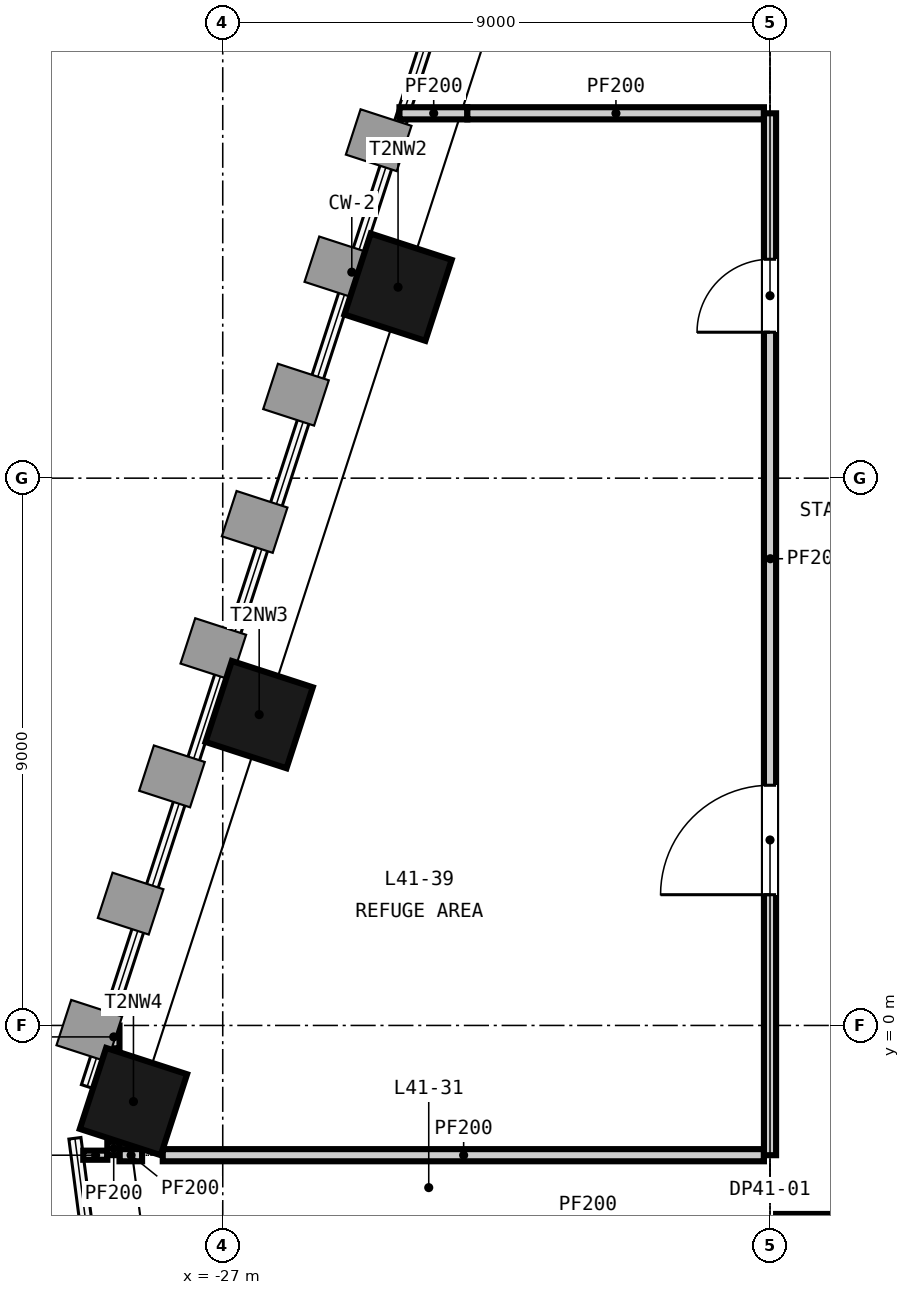
"""IFC4 building model, lengths in metres.
Left out: names, types, materials, properties, quantities, classifications, styles, units other than length and angle.
Written with IfcOpenShell. Run it as: python <this file> out.ifc"""

import sys

from ifc_helpers import new_model, si_unit, direction, frame, frame_2d, origin, origin_2d, place, context, subcontext, project, spatial, rectangle, extrude, element, fill, save


model = new_model("IFC4")
c1 = context("Model", 3, precision=1e-05, world=origin(), true_north=direction((0.0, 1.0)))
c2 = subcontext(c1, "Body", "Model", "MODEL_VIEW")
j1 = project(units=[si_unit("LENGTHUNIT", "METRE"), si_unit("PLANEANGLEUNIT", "RADIAN")], contexts=[c1])
p1 = place(None, origin())
s1 = spatial("IfcSite", under=j1, at=p1, CompositionType="ELEMENT")
p2 = place(p1, origin())
s2 = spatial("IfcBuilding", under=s1, at=p2, CompositionType="ELEMENT")
p3 = place(p2, frame((0.0, 0.0, 166.3)))
s3 = spatial("IfcBuildingStorey", under=s2, at=p3, CompositionType="ELEMENT", Elevation=166.3)
for number, where, z_axis, x_axis in (
    (1, (-24.117, 12.141, -0.3), (0.0, 0.0, 1.0), (-0.309, -0.951, 0.0)),
    (2, (-26.401, 5.111, -0.3), (0.0, 0.0, 1.0), (-0.309, -0.951, 0.0)),
    (3, (-28.468, -1.252, -0.3), (0.0, 0.0, 1.0), (-0.309, -0.951, 0.0)),
):
    element("IfcColumn", number, at=place(p3, frame(where, z_axis=z_axis, x_axis=x_axis)), inside=s3, PredefinedType="COLUMN", context=c2, shape_type="SweptSolid", body=[
        extrude(rectangle(XDim=1.4, YDim=1.4, at=origin_2d()), origin(), (0.0, 0.0, 1.0), 4.65),
    ])
p4 = place(p3, frame((-17.9, -3.2, 0.0), z_axis=(0.0, 0.0, 1.0), x_axis=(1.0, 0.0, 0.0)))
e4 = element("IfcWall", 4, at=p4, inside=s3, PredefinedType="PARTITIONING", context=c2, shape_type="SweptSolid", body=[
    extrude(rectangle(XDim=8.8, YDim=0.2, at=frame_2d((4.4, 0.0))), origin(), (0.0, 0.0, 1.0), 4.35),
])
p5 = place(p3, frame((-29.294, -2.134, 0.0), z_axis=(0.0, 0.0, 1.0), x_axis=(1.0, 0.0, 0.0)))
e5 = element("IfcWall", 5, at=p5, inside=s3, PredefinedType="PARTITIONING", context=c2, shape_type="SweptSolid", body=[
    extrude(rectangle(XDim=0.396, YDim=0.15, at=frame_2d((0.198, 0.0))), origin(), (0.0, 0.0, 1.0), 4.35),
])
p6 = place(p3, frame((-28.698, -2.134, 0.0), z_axis=(0.0, 0.0, 1.0), x_axis=(1.0, 0.0, 0.0)))
e6 = element("IfcWall", 6, at=p6, inside=s3, PredefinedType="PARTITIONING", context=c2, shape_type="SweptSolid", body=[
    extrude(rectangle(XDim=0.372, YDim=0.2, at=frame_2d((0.186, 0.0))), origin(), (0.0, 0.0, 1.0), 4.35),
])
p7 = place(p3, frame((-27.986, -2.134, 0.0), z_axis=(0.0, 0.0, 1.0), x_axis=(1.0, 0.0, 0.0)))
e7 = element("IfcWall", 7, at=p7, inside=s3, PredefinedType="PARTITIONING", context=c2, shape_type="SweptSolid", body=[
    extrude(rectangle(XDim=9.886, YDim=0.2, at=frame_2d((4.943, 0.0))), origin(), (0.0, 0.0, 1.0), 4.35),
])
p8 = place(p3, frame((-24.094, 15.0, 0.0), z_axis=(0.0, 0.0, 1.0), x_axis=(1.0, 0.0, 0.0)))
e8 = element("IfcWall", 8, at=p8, inside=s3, PredefinedType="PARTITIONING", context=c2, shape_type="SweptSolid", body=[
    extrude(rectangle(XDim=1.116, YDim=0.2, at=frame_2d((0.558, 0.0))), origin(), (0.0, 0.0, 1.0), 3.6),
])
p9 = place(p3, frame((-22.978, 15.0, 0.0), z_axis=(0.0, 0.0, 1.0), x_axis=(1.0, 0.0, 0.0)))
e9 = element("IfcWall", 9, at=p9, inside=s3, PredefinedType="PARTITIONING", context=c2, shape_type="SweptSolid", body=[
    extrude(rectangle(XDim=4.877, YDim=0.2, at=frame_2d((2.439, 0.0))), origin(), (0.0, 0.0, 1.0), 4.35),
])
p10 = place(p3, frame((-28.798, -2.133, 0.0), z_axis=(0.0, 0.0, 1.0), x_axis=(0.0, 1.0, 0.0)))
e10 = element("IfcWall", 10, at=p10, inside=s3, PredefinedType="PARTITIONING", context=c2, shape_type="SweptSolid", body=[
    extrude(rectangle(XDim=0.219, YDim=0.2, at=frame_2d((0.11, 0.0))), origin(), (0.0, 0.0, 1.0), 4.35),
])
p11 = place(p3, frame((-28.798, -0.376, 0.0), z_axis=(0.0, 0.0, 1.0), x_axis=(0.0, 1.0, 0.0)))
e11 = element("IfcWall", 11, at=p11, inside=s3, PredefinedType="PARTITIONING", context=c2, shape_type="SweptSolid", body=[
    extrude(rectangle(XDim=0.375, YDim=0.2, at=frame_2d((0.188, 0.0))), origin(), (0.0, 0.0, 1.0), 4.35),
])
p12 = place(p3, frame((-18.0, -2.134, 0.0), z_axis=(0.0, 0.0, 1.0), x_axis=(0.0, 1.0, 0.0)))
e12 = element("IfcWall", 12, at=p12, inside=s3, PredefinedType="PARTITIONING", context=c2, shape_type="SweptSolid", body=[
    extrude(rectangle(XDim=17.134, YDim=0.2, at=frame_2d((8.567, 0.0))), origin(), (0.0, 0.0, 1.0), 4.35),
])
p13 = place(p12, frame((4.284, 0.0, 0.0)))
e13 = element("IfcOpeningElement", 13, at=p13, cuts=e12, PredefinedType="OPENING", context=c2, shape_type="SweptSolid", body=[
    extrude(rectangle(XDim=1.8, YDim=2.4, at=frame_2d((0.9, 1.2))), frame((0.0, 0.11, 0.0), z_axis=(0.0, -1.0, 0.0), x_axis=(1.0, 0.0, 0.0)), (0.0, 0.0, 1.0), 0.22),
])
p14 = place(p12, frame((13.534, 0.0, 0.0)))
e14 = element("IfcOpeningElement", 14, at=p14, cuts=e12, PredefinedType="OPENING", context=c2, shape_type="SweptSolid", body=[
    extrude(rectangle(XDim=1.2, YDim=2.1, at=frame_2d((0.6, 1.05))), frame((0.0, 0.11, 0.0), z_axis=(0.0, -1.0, 0.0), x_axis=(1.0, 0.0, 0.0)), (0.0, 0.0, 1.0), 0.22),
])
p15 = place(p13, origin())
e15 = element("IfcDoor", 15, at=p15, inside=s3, OperationType="SINGLE_SWING_LEFT", PredefinedType="DOOR", context=c2, shape_type="SweptSolid", body=[
    extrude(rectangle(XDim=1.8, YDim=2.4, at=frame_2d((0.9, 1.2))), frame((0.0, 0.025, 0.0), z_axis=(0.0, -1.0, 0.0), x_axis=(1.0, 0.0, 0.0)), (0.0, 0.0, 1.0), 0.05),
])
fill(e13, e15)
p16 = place(p14, origin())
e16 = element("IfcDoor", 16, at=p16, inside=s3, OperationType="SINGLE_SWING_LEFT", PredefinedType="DOOR", context=c2, shape_type="SweptSolid", body=[
    extrude(rectangle(XDim=1.2, YDim=2.1, at=frame_2d((0.6, 1.05))), frame((0.0, 0.025, 0.0), z_axis=(0.0, -1.0, 0.0), x_axis=(1.0, 0.0, 0.0)), (0.0, 0.0, 1.0), 0.05),
])
fill(e14, e16)
save(model, sys.argv[1])
